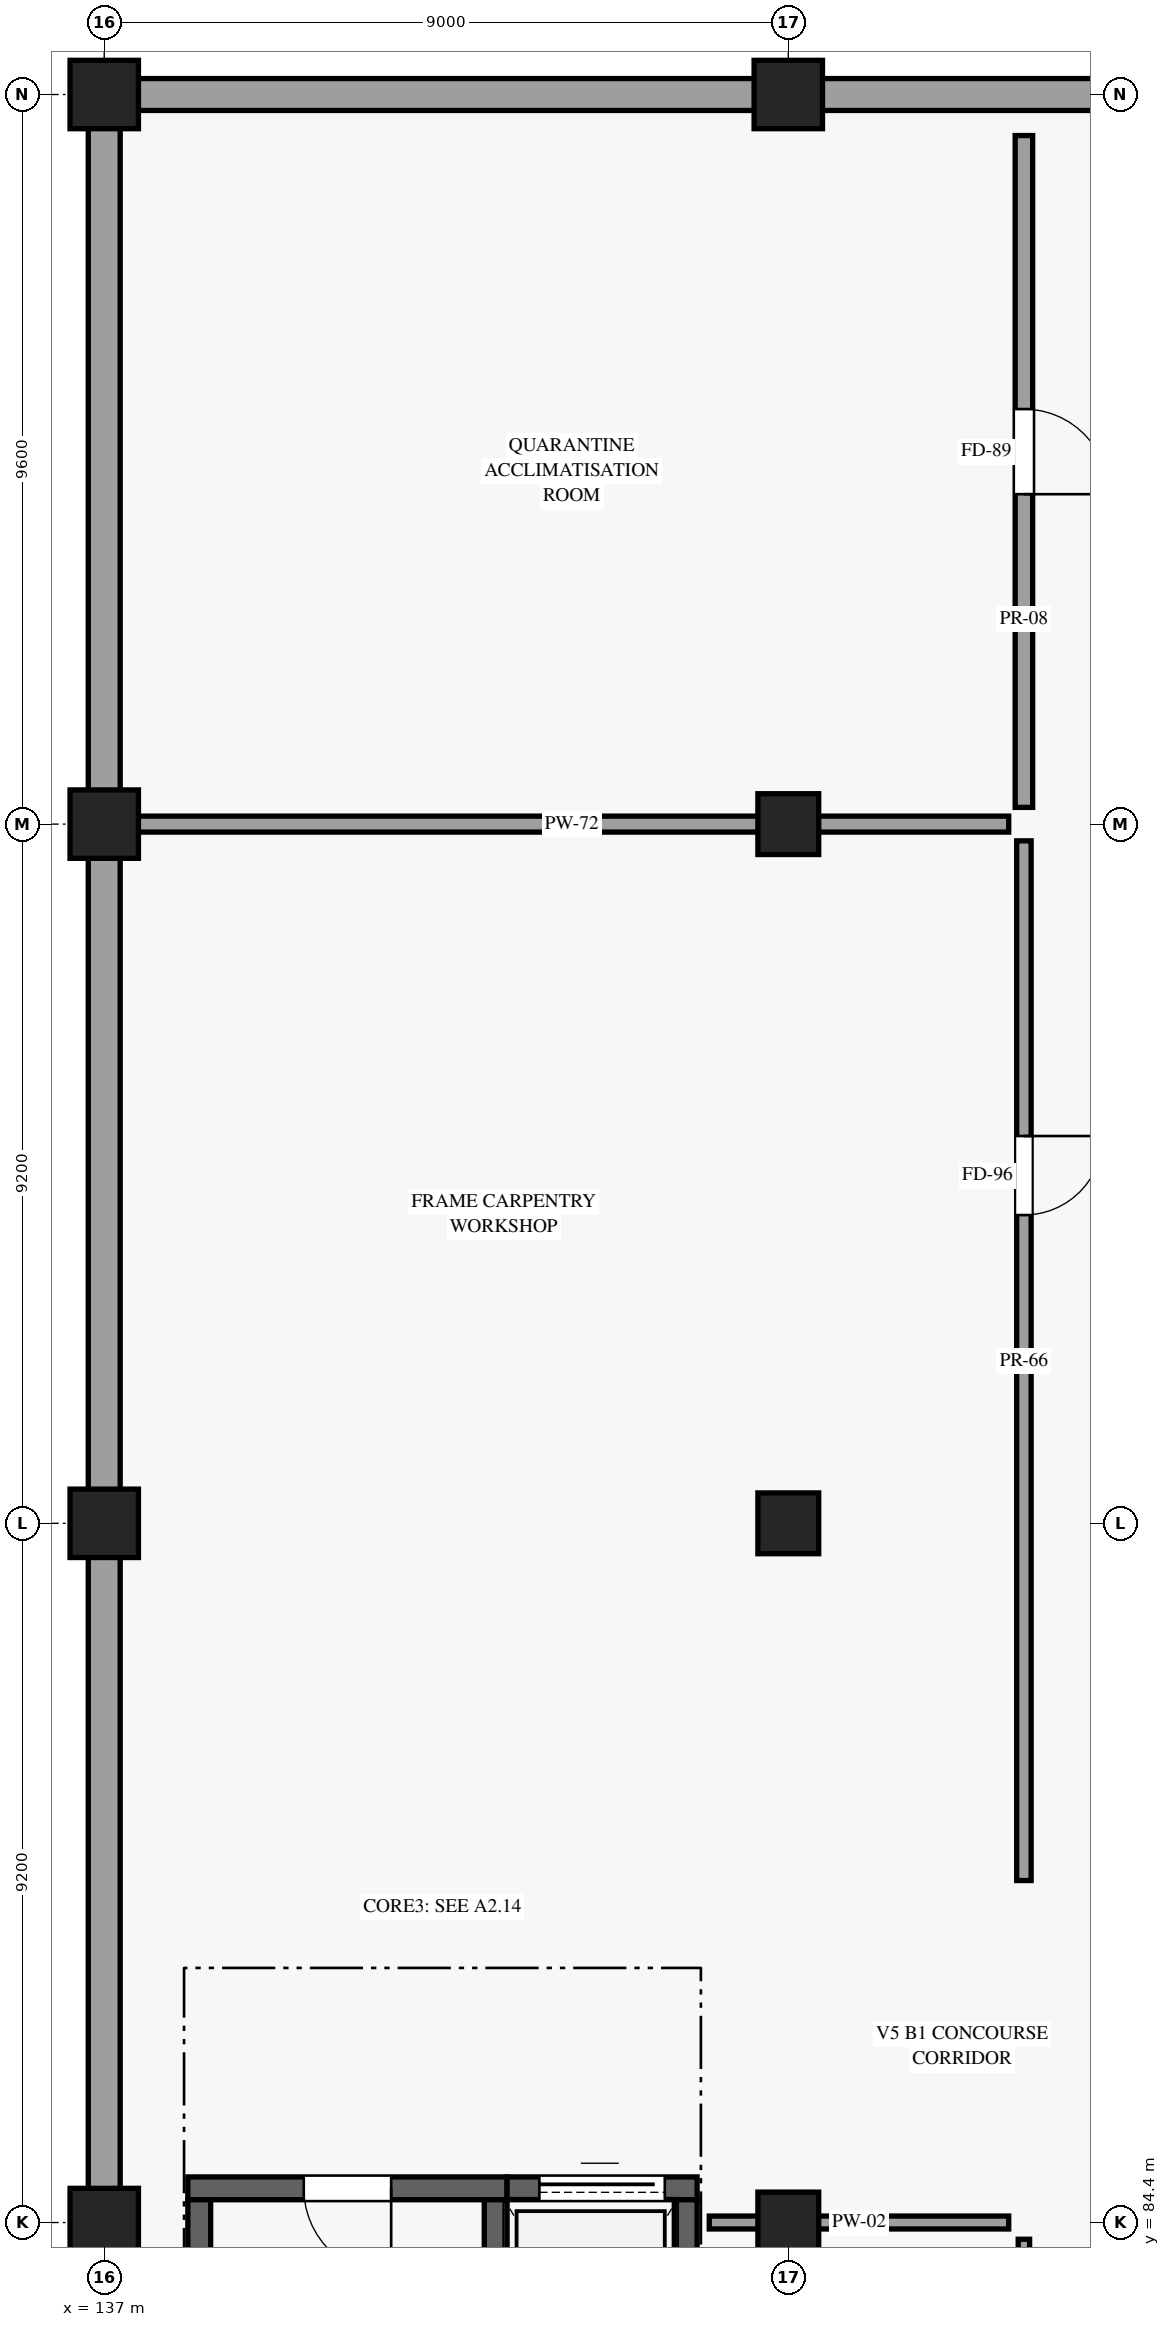
"""IFC4 building model, lengths in metres.
Left out: names, types, materials, properties, quantities, classifications, styles, units other than length and angle.
Written with IfcOpenShell. Run it as: python <this file> out.ifc"""

import sys

from ifc_helpers import new_model, si_unit, direction, frame, frame_2d, origin, origin_2d, place, context, subcontext, project, spatial, rectangle, extrude, element, fill, save


model = new_model("IFC4")
c1 = context("Model", 3, precision=1e-05, world=origin(), true_north=direction((0.0, 1.0)))
c2 = subcontext(c1, "Body", "Model", "MODEL_VIEW")
j1 = project(units=[si_unit("LENGTHUNIT", "METRE"), si_unit("PLANEANGLEUNIT", "RADIAN")], contexts=[c1])
p1 = place(None, origin())
s1 = spatial("IfcSite", under=j1, at=p1, CompositionType="ELEMENT")
p2 = place(p1, origin())
s2 = spatial("IfcBuilding", under=s1, at=p2, CompositionType="ELEMENT")
p3 = place(p2, frame((0.0, 0.0, -4.8)))
s3 = spatial("IfcBuildingStorey", under=s2, at=p3, CompositionType="ELEMENT", Elevation=-4.8)
for number, where, z_axis, x_axis in (
    (1, (137.0, 84.4, 0.0), (0.0, 0.0, 1.0), (1.0, 0.0, 0.0)),
    (2, (137.0, 93.6, 0.0), (0.0, 0.0, 1.0), (1.0, 0.0, 0.0)),
    (3, (137.0, 102.8, 0.0), (0.0, 0.0, 1.0), (1.0, 0.0, 0.0)),
    (4, (137.0, 112.4, 0.0), (0.0, 0.0, 1.0), (1.0, 0.0, 0.0)),
):
    element("IfcColumn", number, at=place(p3, frame(where, z_axis=z_axis, x_axis=x_axis)), inside=s3, PredefinedType="COLUMN", context=c2, shape_type="SweptSolid", body=[
        extrude(rectangle(XDim=0.9, YDim=0.9, at=origin_2d()), origin(), (0.0, 0.0, 1.0), 4.8),
    ])
for number, where, z_axis, x_axis in (
    (5, (146.0, 84.4, 0.0), (0.0, 0.0, 1.0), (1.0, 0.0, 0.0)),
    (6, (146.0, 93.6, 0.0), (0.0, 0.0, 1.0), (1.0, 0.0, 0.0)),
    (7, (146.0, 102.8, 0.0), (0.0, 0.0, 1.0), (1.0, 0.0, 0.0)),
):
    element("IfcColumn", number, at=place(p3, frame(where, z_axis=z_axis, x_axis=x_axis)), inside=s3, PredefinedType="COLUMN", context=c2, shape_type="SweptSolid", body=[
        extrude(rectangle(XDim=0.8, YDim=0.8, at=origin_2d()), origin(), (0.0, 0.0, 1.0), 4.8),
    ])
p4 = place(p3, frame((146.0, 112.4, 0.0), z_axis=(0.0, 0.0, 1.0), x_axis=(1.0, 0.0, 0.0)))
e8 = element("IfcColumn", 8, at=p4, inside=s3, PredefinedType="COLUMN", context=c2, shape_type="SweptSolid", body=[
    extrude(rectangle(XDim=0.9, YDim=0.9, at=origin_2d()), origin(), (0.0, 0.0, 1.0), 4.8),
])
p5 = place(p3, frame((136.79, 112.4, 0.0), z_axis=(0.0, 0.0, 1.0), x_axis=(1.0, 0.0, 0.0)))
e9 = element("IfcWall", 9, at=p5, inside=s3, PredefinedType="SOLIDWALL", context=c2, shape_type="SweptSolid", body=[
    extrude(rectangle(XDim=27.42, YDim=0.42, at=frame_2d((13.71, 0.0))), origin(), (0.0, 0.0, 1.0), 3.415),
])
p6 = place(p3, frame((137.0, 75.2, 0.0), z_axis=(0.0, 0.0, 1.0), x_axis=(0.0, 1.0, 0.0)))
e10 = element("IfcWall", 10, at=p6, inside=s3, PredefinedType="SOLIDWALL", context=c2, shape_type="SweptSolid", body=[
    extrude(rectangle(XDim=37.2, YDim=0.42, at=frame_2d((18.6, 0.0))), origin(), (0.0, 0.0, 1.0), 3.415),
])
p7 = place(p3, frame((138.1, 84.85, 0.0), z_axis=(0.0, 0.0, 1.0), x_axis=(1.0, 0.0, 0.0)))
e11 = element("IfcWall", 11, at=p7, inside=s3, PredefinedType="SHEAR", context=c2, shape_type="SweptSolid", body=[
    extrude(rectangle(XDim=4.2, YDim=0.3, at=frame_2d((2.1, 0.0))), origin(), (0.0, 0.0, 1.0), 4.48),
])
p8 = place(p7, frame((2.675, 0.0, 0.0), z_axis=(0.0, 0.0, 1.0), x_axis=(-1.0, 0.0, 0.0)))
e12 = element("IfcOpeningElement", 12, at=p8, cuts=e11, PredefinedType="OPENING", context=c2, shape_type="SweptSolid", body=[
    extrude(rectangle(XDim=1.15, YDim=2.2, at=frame_2d((0.575, 1.1))), frame((0.0, 0.16, 0.0), z_axis=(0.0, -1.0, 0.0), x_axis=(1.0, 0.0, 0.0)), (0.0, 0.0, 1.0), 0.32),
])
for number, where, z_axis, x_axis in (
    (13, (138.25, 76.05, 0.0), (0.0, 0.0, 1.0), (0.0, 1.0, 0.0)),
    (14, (142.15, 76.05, 0.0), (0.0, 0.0, 1.0), (0.0, 1.0, 0.0)),
):
    element("IfcWall", number, at=place(p3, frame(where, z_axis=z_axis, x_axis=x_axis)), inside=s3, PredefinedType="SHEAR", context=c2, shape_type="SweptSolid", body=[
        extrude(rectangle(XDim=8.65, YDim=0.3, at=frame_2d((4.325, 0.0))), origin(), (0.0, 0.0, 1.0), 4.48),
    ])
p9 = place(p3, frame((142.3, 84.85, 0.0), z_axis=(0.0, 0.0, 1.0), x_axis=(1.0, 0.0, 0.0)))
e15 = element("IfcWall", 15, at=p9, inside=s3, PredefinedType="SHEAR", context=c2, shape_type="SweptSolid", body=[
    extrude(rectangle(XDim=2.5, YDim=0.3, at=frame_2d((1.25, 0.0))), origin(), (0.0, 0.0, 1.0), 4.48),
])
p10 = place(p9, frame((0.425, 0.0, 0.0)))
e16 = element("IfcOpeningElement", 16, at=p10, cuts=e15, PredefinedType="OPENING", context=c2, shape_type="SweptSolid", body=[
    extrude(rectangle(XDim=1.65, YDim=2.45, at=frame_2d((0.825, 1.225))), frame((0.0, 0.16, 0.0), z_axis=(0.0, -1.0, 0.0), x_axis=(1.0, 0.0, 0.0)), (0.0, 0.0, 1.0), 0.32),
])
p11 = place(p3, frame((144.65, 80.9, 0.0), z_axis=(0.0, 0.0, 1.0), x_axis=(0.0, 1.0, 0.0)))
e17 = element("IfcWall", 17, at=p11, inside=s3, PredefinedType="SHEAR", context=c2, shape_type="SweptSolid", body=[
    extrude(rectangle(XDim=3.8, YDim=0.3, at=frame_2d((1.9, 0.0))), origin(), (0.0, 0.0, 1.0), 4.48),
])
p12 = place(p3, frame((149.1, 75.74, 0.0), z_axis=(0.0, 0.0, 1.0), x_axis=(0.0, 1.0, 0.0)))
e18 = element("IfcWall", 18, at=p12, inside=s3, PredefinedType="PARTITIONING", context=c2, shape_type="SweptSolid", body=[
    extrude(rectangle(XDim=8.44, YDim=0.15, at=frame_2d((4.22, 0.0))), origin(), (0.0, 0.0, 1.0), 3.415),
])
p13 = place(p12, frame((4.499, 0.0, 0.0), z_axis=(0.0, 0.0, 1.0), x_axis=(-1.0, 0.0, 0.0)))
e19 = element("IfcOpeningElement", 19, at=p13, cuts=e18, PredefinedType="OPENING", context=c2, shape_type="SweptSolid", body=[
    extrude(rectangle(XDim=0.98, YDim=2.18, at=frame_2d((0.49, 1.09))), frame((0.0, 0.085, 0.0), z_axis=(0.0, -1.0, 0.0), x_axis=(1.0, 0.0, 0.0)), (0.0, 0.0, 1.0), 0.17),
])
p14 = place(p3, frame((144.96, 84.4, 0.0), z_axis=(0.0, 0.0, 1.0), x_axis=(1.0, 0.0, 0.0)))
e20 = element("IfcWall", 20, at=p14, inside=s3, PredefinedType="PARTITIONING", context=c2, shape_type="SweptSolid", body=[
    extrude(rectangle(XDim=3.94, YDim=0.17, at=frame_2d((1.97, 0.0))), origin(), (0.0, 0.0, 1.0), 3.415),
])
p15 = place(p3, frame((149.1, 88.9, 0.0), z_axis=(0.0, 0.0, 1.0), x_axis=(0.0, 1.0, 0.0)))
e21 = element("IfcWall", 21, at=p15, inside=s3, PredefinedType="PARTITIONING", context=c2, shape_type="SweptSolid", body=[
    extrude(rectangle(XDim=13.68, YDim=0.19, at=frame_2d((6.84, 0.0))), origin(), (0.0, 0.0, 1.0), 3.415),
])
p16 = place(p15, frame((9.796, 0.0, 0.0), z_axis=(0.0, 0.0, 1.0), x_axis=(-1.0, 0.0, 0.0)))
e22 = element("IfcOpeningElement", 22, at=p16, cuts=e21, PredefinedType="OPENING", context=c2, shape_type="SweptSolid", body=[
    extrude(rectangle(XDim=1.04, YDim=2.22, at=frame_2d((0.52, 1.11))), frame((0.0, 0.105, 0.0), z_axis=(0.0, -1.0, 0.0), x_axis=(1.0, 0.0, 0.0)), (0.0, 0.0, 1.0), 0.21),
])
p17 = place(p3, frame((137.4, 102.8, 0.0), z_axis=(0.0, 0.0, 1.0), x_axis=(1.0, 0.0, 0.0)))
e23 = element("IfcWall", 23, at=p17, inside=s3, PredefinedType="PARTITIONING", context=c2, shape_type="SweptSolid", body=[
    extrude(rectangle(XDim=11.5, YDim=0.21, at=frame_2d((5.75, 0.0))), origin(), (0.0, 0.0, 1.0), 3.415),
])
p18 = place(p3, frame((149.1, 103.02, 0.0), z_axis=(0.0, 0.0, 1.0), x_axis=(0.0, 1.0, 0.0)))
e24 = element("IfcWall", 24, at=p18, inside=s3, PredefinedType="PARTITIONING", context=c2, shape_type="SweptSolid", body=[
    extrude(rectangle(XDim=8.84, YDim=0.23, at=frame_2d((4.42, 0.0))), origin(), (0.0, 0.0, 1.0), 3.415),
])
p19 = place(p18, frame((5.241, 0.0, 0.0), z_axis=(0.0, 0.0, 1.0), x_axis=(-1.0, 0.0, 0.0)))
e25 = element("IfcOpeningElement", 25, at=p19, cuts=e24, PredefinedType="OPENING", context=c2, shape_type="SweptSolid", body=[
    extrude(rectangle(XDim=1.12, YDim=2.26, at=frame_2d((0.56, 1.13))), frame((0.0, 0.125, 0.0), z_axis=(0.0, -1.0, 0.0), x_axis=(1.0, 0.0, 0.0)), (0.0, 0.0, 1.0), 0.25),
])
p20 = place(p8, origin())
e26 = element("IfcDoor", 26, at=p20, inside=s3, OperationType="SINGLE_SWING_LEFT", PredefinedType="DOOR", context=c2, shape_type="SweptSolid", body=[
    extrude(rectangle(XDim=1.15, YDim=2.2, at=frame_2d((0.575, 1.1))), frame((0.0, 0.025, 0.0), z_axis=(0.0, -1.0, 0.0), x_axis=(1.0, 0.0, 0.0)), (0.0, 0.0, 1.0), 0.05),
])
fill(e12, e26)
p21 = place(p10, origin())
e27 = element("IfcDoor", 27, at=p21, inside=s3, OperationType="SLIDING_TO_LEFT", PredefinedType="DOOR", context=c2, shape_type="SweptSolid", body=[
    extrude(rectangle(XDim=1.65, YDim=2.45, at=frame_2d((0.825, 1.225))), frame((0.0, 0.025, 0.0), z_axis=(0.0, -1.0, 0.0), x_axis=(1.0, 0.0, 0.0)), (0.0, 0.0, 1.0), 0.05),
])
fill(e16, e27)
p22 = place(p16, origin())
e28 = element("IfcDoor", 28, at=p22, inside=s3, OperationType="SINGLE_SWING_LEFT", PredefinedType="DOOR", context=c2, shape_type="SweptSolid", body=[
    extrude(rectangle(XDim=1.04, YDim=2.22, at=frame_2d((0.52, 1.11))), frame((0.0, 0.025, 0.0), z_axis=(0.0, -1.0, 0.0), x_axis=(1.0, 0.0, 0.0)), (0.0, 0.0, 1.0), 0.05),
])
fill(e22, e28)
p23 = place(p19, origin())
e29 = element("IfcDoor", 29, at=p23, inside=s3, OperationType="SINGLE_SWING_RIGHT", PredefinedType="DOOR", context=c2, shape_type="SweptSolid", body=[
    extrude(rectangle(XDim=1.12, YDim=2.26, at=frame_2d((0.56, 1.13))), frame((0.0, 0.025, 0.0), z_axis=(0.0, -1.0, 0.0), x_axis=(1.0, 0.0, 0.0)), (0.0, 0.0, 1.0), 0.05),
])
fill(e25, e29)
save(model, sys.argv[1])
